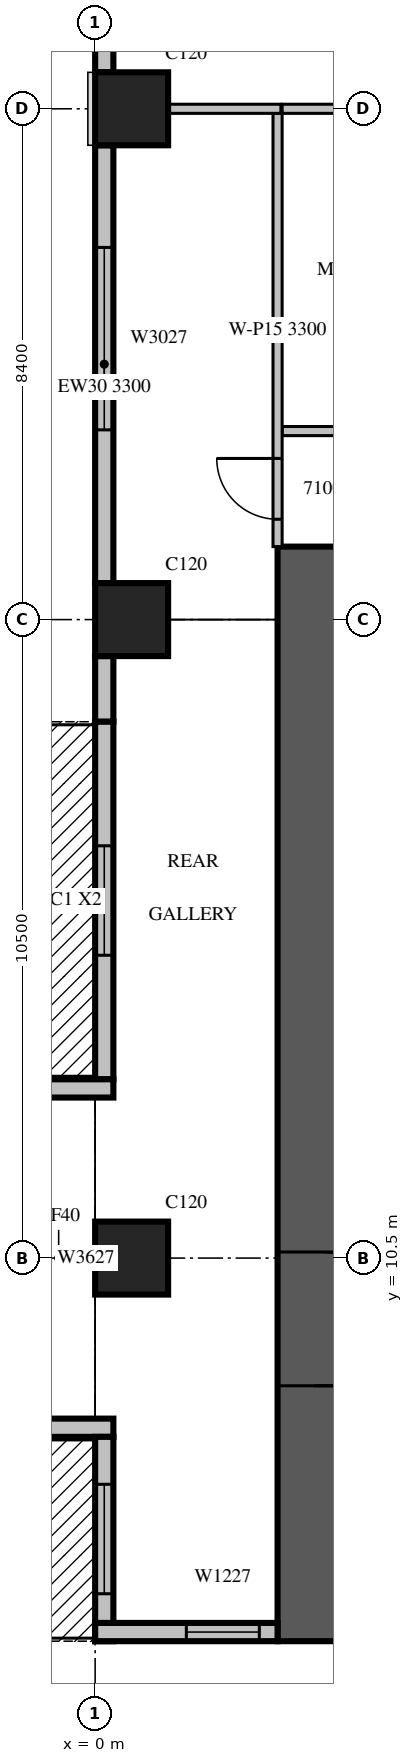
"""IFC4 building model, lengths in metres.
Left out: names, types, materials, properties, quantities, classifications, styles, units other than length and angle.
Written with IfcOpenShell. Run it as: python <this file> out.ifc"""

import sys

from ifc_helpers import new_model, si_unit, direction, frame, frame_2d, origin, origin_2d, place, context, subcontext, project, spatial, rectangle, extrude, source, transform, mapped, element, fill, save


model = new_model("IFC4")
c1 = context("Model", 3, precision=1e-05, world=origin(), true_north=direction((0.0, 1.0)))
c2 = subcontext(c1, "Body", "Model", "MODEL_VIEW")
j1 = project(units=[si_unit("LENGTHUNIT", "METRE"), si_unit("PLANEANGLEUNIT", "RADIAN")], contexts=[c1])
p1 = place(None, origin())
s1 = spatial("IfcSite", under=j1, at=p1, CompositionType="ELEMENT")
p2 = place(p1, origin())
s2 = spatial("IfcBuilding", under=s1, at=p2, CompositionType="ELEMENT")
p3 = place(p2, frame((0.0, 0.0, 53.1)))
s3 = spatial("IfcBuildingStorey", under=s2, at=p3, CompositionType="ELEMENT", Elevation=53.1)
m1 = source(origin(), c2, "Body", "SweptSolid", [
    extrude(rectangle(XDim=1.2, YDim=1.2, at=origin_2d()), origin(), (0.0, 0.0, 1.0), 4.2),
])
for number, where, z_axis, x_axis in (
    (1, (0.6, 10.5, 0.0), (0.0, 0.0, 1.0), (1.0, 0.0, 0.0)),
    (2, (0.6, 21.0, 0.0), (0.0, 0.0, 1.0), (1.0, 0.0, 0.0)),
    (3, (0.6, 29.4, 0.0), (0.0, 0.0, 1.0), (1.0, 0.0, 0.0)),
):
    element("IfcColumn", number, at=place(p3, frame(where, z_axis=z_axis, x_axis=x_axis)), inside=s3, PredefinedType="COLUMN", context=c2, shape_type="MappedRepresentation", body=[
        mapped(m1, transform((0.0, 0.0, 0.0), scale=1.0)),
    ])
m2 = source(origin(), c2, "Body", "SweptSolid", [
    extrude(rectangle(XDim=18.0, YDim=1.2, at=frame_2d((9.0, 0.0))), origin(), (0.0, 0.0, 1.0), 4.2),
])
p4 = place(p3, frame((3.6, 4.2, 0.0), z_axis=(0.0, 0.0, 1.0), x_axis=(0.0, 1.0, 0.0)))
e4 = element("IfcWall", 4, at=p4, inside=s3, PredefinedType="SHEAR", context=c2, shape_type="MappedRepresentation", body=[
    mapped(m2, transform((0.0, 0.0, 0.0), scale=1.0)),
])
m3 = source(origin(), c2, "Body", "SweptSolid", [
    extrude(rectangle(XDim=2.2, YDim=2.1, at=frame_2d((1.1, 1.05))), frame((0.0, 0.61, 0.0), z_axis=(0.0, -1.0, 0.0), x_axis=(1.0, 0.0, 0.0)), (0.0, 0.0, 1.0), 1.22),
])
p5 = place(p4, frame((4.2, 0.0, 0.0)))
e5 = element("IfcOpeningElement", 5, at=p5, cuts=e4, PredefinedType="OPENING", context=c2, shape_type="MappedRepresentation", body=[
    mapped(m3, transform((0.0, 0.0, 0.0), scale=1.0)),
])
m4 = source(origin(), c2, "Body", "SweptSolid", [
    extrude(rectangle(XDim=7.2, YDim=0.3, at=frame_2d((3.6, 0.0))), origin(), (0.0, 0.0, 1.0), 3.8),
])
p6 = place(p3, frame((0.15, 37.2, 0.0), z_axis=(0.0, 0.0, 1.0), x_axis=(0.0, -1.0, 0.0)))
e6 = element("IfcWall", 6, at=p6, inside=s3, PredefinedType="STANDARD", context=c2, shape_type="MappedRepresentation", body=[
    mapped(m4, transform((0.0, 0.0, 0.0), scale=1.0)),
])
m5 = source(origin(), c2, "Body", "SweptSolid", [
    extrude(rectangle(XDim=1.8, YDim=2.7, at=frame_2d((0.9, 1.35))), frame((0.0, 0.16, 0.0), z_axis=(0.0, -1.0, 0.0), x_axis=(1.0, 0.0, 0.0)), (0.0, 0.0, 1.0), 0.32),
])
p7 = place(p6, frame((0.738, 0.0, 0.6)))
e7 = element("IfcOpeningElement", 7, at=p7, cuts=e6, PredefinedType="OPENING", context=c2, shape_type="MappedRepresentation", body=[
    mapped(m5, transform((0.0, 0.0, 0.0), scale=1.0)),
])
m6 = source(origin(), c2, "Body", "SweptSolid", [
    extrude(rectangle(XDim=2.4, YDim=2.7, at=frame_2d((1.2, 1.35))), frame((0.0, 0.16, 0.0), z_axis=(0.0, -1.0, 0.0), x_axis=(1.0, 0.0, 0.0)), (0.0, 0.0, 1.0), 0.32),
])
p8 = place(p6, frame((3.7, 0.0, 0.6)))
e8 = element("IfcOpeningElement", 8, at=p8, cuts=e6, PredefinedType="OPENING", context=c2, shape_type="MappedRepresentation", body=[
    mapped(m6, transform((0.0, 0.0, 0.0), scale=1.0)),
])
m7 = source(origin(), c2, "Body", "SweptSolid", [
    extrude(rectangle(XDim=7.2, YDim=0.3, at=frame_2d((3.6, 0.0))), origin(), (0.0, 0.0, 1.0), 3.3),
])
p9 = place(p3, frame((0.15, 28.8, 0.0), z_axis=(0.0, 0.0, 1.0), x_axis=(0.0, -1.0, 0.0)))
e9 = element("IfcWall", 9, at=p9, inside=s3, PredefinedType="STANDARD", context=c2, shape_type="MappedRepresentation", body=[
    mapped(m7, transform((0.0, 0.0, 0.0), scale=1.0)),
])
m8 = source(origin(), c2, "Body", "SweptSolid", [
    extrude(rectangle(XDim=3.0, YDim=2.7, at=frame_2d((1.5, 1.35))), frame((0.0, 0.16, 0.0), z_axis=(0.0, -1.0, 0.0), x_axis=(1.0, 0.0, 0.0)), (0.0, 0.0, 1.0), 0.32),
])
p10 = place(p9, frame((1.68, 0.0, 0.6)))
e10 = element("IfcOpeningElement", 10, at=p10, cuts=e9, PredefinedType="OPENING", context=c2, shape_type="MappedRepresentation", body=[
    mapped(m8, transform((0.0, 0.0, 0.0), scale=1.0)),
])
m9 = source(origin(), c2, "Body", "SweptSolid", [
    extrude(rectangle(XDim=1.08, YDim=0.3, at=frame_2d((0.54, 0.0))), origin(), (0.0, 0.0, 1.0), 3.8),
])
p11 = place(p3, frame((0.15, 20.4, 0.0), z_axis=(0.0, 0.0, 1.0), x_axis=(0.0, -1.0, 0.0)))
e11 = element("IfcWall", 11, at=p11, inside=s3, PredefinedType="STANDARD", context=c2, shape_type="MappedRepresentation", body=[
    mapped(m9, transform((0.0, 0.0, 0.0), scale=1.0)),
])
m10 = source(origin(), c2, "Body", "SweptSolid", [
    extrude(rectangle(XDim=5.88, YDim=0.3, at=frame_2d((2.94, 0.0))), origin(), (0.0, 0.0, 1.0), 3.8),
])
p12 = place(p3, frame((0.15, 19.32, 0.0), z_axis=(0.0, 0.0, 1.0), x_axis=(0.0, -1.0, 0.0)))
e12 = element("IfcWall", 12, at=p12, inside=s3, PredefinedType="STANDARD", context=c2, shape_type="MappedRepresentation", body=[
    mapped(m10, transform((0.0, 0.0, 0.0), scale=1.0)),
])
m11 = source(origin(), c2, "Body", "SweptSolid", [
    extrude(rectangle(XDim=1.8, YDim=2.4, at=frame_2d((0.9, 1.2))), frame((0.0, 0.16, 0.0), z_axis=(0.0, -1.0, 0.0), x_axis=(1.0, 0.0, 0.0)), (0.0, 0.0, 1.0), 0.32),
])
p13 = place(p12, frame((2.04, 0.0, 0.0)))
e13 = element("IfcOpeningElement", 13, at=p13, cuts=e12, PredefinedType="OPENING", context=c2, shape_type="MappedRepresentation", body=[
    mapped(m11, transform((0.0, 0.0, 0.0), scale=1.0)),
])
m12 = source(origin(), c2, "Body", "SweptSolid", [
    extrude(rectangle(XDim=1.2, YDim=0.3, at=frame_2d((0.6, 0.0))), origin(), (0.0, 0.0, 1.0), 3.8),
])
for number, where, z_axis, x_axis in (
    (14, (0.3, 13.29, 0.0), (0.0, 0.0, 1.0), (-1.0, 0.0, 0.0)),
    (15, (0.3, 7.71, 0.0), (0.0, 0.0, 1.0), (-1.0, 0.0, 0.0)),
):
    element("IfcWall", number, at=place(p3, frame(where, z_axis=z_axis, x_axis=x_axis)), inside=s3, PredefinedType="STANDARD", context=c2, shape_type="MappedRepresentation", body=[
        mapped(m12, transform((0.0, 0.0, 0.0), scale=1.0)),
    ])
m13 = source(origin(), c2, "Body", "SweptSolid", [
    extrude(rectangle(XDim=3.36, YDim=0.3, at=frame_2d((1.68, 0.0))), origin(), (0.0, 0.0, 1.0), 3.8),
])
p14 = place(p3, frame((0.15, 7.56, 0.0), z_axis=(0.0, 0.0, 1.0), x_axis=(0.0, -1.0, 0.0)))
e16 = element("IfcWall", 16, at=p14, inside=s3, PredefinedType="STANDARD", context=c2, shape_type="MappedRepresentation", body=[
    mapped(m13, transform((0.0, 0.0, 0.0), scale=1.0)),
])
p15 = place(p14, frame((0.78, 0.0, 0.0)))
e17 = element("IfcOpeningElement", 17, at=p15, cuts=e16, PredefinedType="OPENING", context=c2, shape_type="MappedRepresentation", body=[
    mapped(m11, transform((0.0, 0.0, 0.0), scale=1.0)),
])
m14 = source(origin(), c2, "Body", "SweptSolid", [
    extrude(rectangle(XDim=3.0, YDim=0.3, at=frame_2d((1.5, 0.0))), origin(), (0.0, 0.0, 1.0), 3.8),
])
p16 = place(p3, frame((0.0, 4.35, 0.0), z_axis=(0.0, 0.0, 1.0), x_axis=(1.0, 0.0, 0.0)))
e18 = element("IfcWall", 18, at=p16, inside=s3, PredefinedType="STANDARD", context=c2, shape_type="MappedRepresentation", body=[
    mapped(m14, transform((0.0, 0.0, 0.0), scale=1.0)),
])
m15 = source(origin(), c2, "Body", "SweptSolid", [
    extrude(rectangle(XDim=1.2, YDim=2.7, at=frame_2d((0.6, 1.35))), frame((0.0, 0.16, 0.0), z_axis=(0.0, -1.0, 0.0), x_axis=(1.0, 0.0, 0.0)), (0.0, 0.0, 1.0), 0.32),
])
p17 = place(p16, frame((1.5, 0.0, 0.6)))
e19 = element("IfcOpeningElement", 19, at=p17, cuts=e18, PredefinedType="OPENING", context=c2, shape_type="MappedRepresentation", body=[
    mapped(m15, transform((0.0, 0.0, 0.0), scale=1.0)),
])
m16 = source(origin(), c2, "Body", "SweptSolid", [
    extrude(rectangle(XDim=11.925, YDim=0.15, at=frame_2d((5.963, 0.0))), origin(), (0.0, 0.0, 1.0), 2.8),
])
p18 = place(p3, frame((3.075, 24.1, 0.0), z_axis=(0.0, 0.0, 1.0), x_axis=(1.0, 0.0, 0.0)))
e20 = element("IfcWall", 20, at=p18, inside=s3, PredefinedType="PARTITIONING", context=c2, shape_type="MappedRepresentation", body=[
    mapped(m16, transform((0.0, 0.0, 0.0), scale=1.0)),
])
m17 = source(origin(), c2, "Body", "SweptSolid", [
    extrude(rectangle(XDim=0.9, YDim=2.1, at=frame_2d((0.45, 1.05))), frame((0.0, 0.085, 0.0), z_axis=(0.0, -1.0, 0.0), x_axis=(1.0, 0.0, 0.0)), (0.0, 0.0, 1.0), 0.17),
])
p19 = place(p18, frame((1.462, 0.0, 0.0)))
e21 = element("IfcOpeningElement", 21, at=p19, cuts=e20, PredefinedType="OPENING", context=c2, shape_type="MappedRepresentation", body=[
    mapped(m17, transform((0.0, 0.0, 0.0), scale=1.0)),
])
p20 = place(p18, frame((8.3, 0.0, 0.0)))
e22 = element("IfcOpeningElement", 22, at=p20, cuts=e20, PredefinedType="OPENING", context=c2, shape_type="MappedRepresentation", body=[
    mapped(m17, transform((0.0, 0.0, 0.0), scale=1.0)),
])
m18 = source(origin(), c2, "Body", "SweptSolid", [
    extrude(rectangle(XDim=6.826, YDim=0.15, at=frame_2d((3.413, 0.0))), origin(), (0.0, 0.0, 1.0), 3.8),
])
p21 = place(p3, frame((9.901, 29.4, 0.0), z_axis=(0.0, 0.0, 1.0), x_axis=(-1.0, 0.0, 0.0)))
e23 = element("IfcWall", 23, at=p21, inside=s3, PredefinedType="PARTITIONING", context=c2, shape_type="MappedRepresentation", body=[
    mapped(m18, transform((0.0, 0.0, 0.0), scale=1.0)),
])
m19 = source(origin(), c2, "Body", "SweptSolid", [
    extrude(rectangle(XDim=7.125, YDim=0.15, at=frame_2d((3.562, 0.0))), origin(), (0.0, 0.0, 1.0), 3.3),
])
p22 = place(p3, frame((3.0, 29.325, 0.0), z_axis=(0.0, 0.0, 1.0), x_axis=(0.0, -1.0, 0.0)))
e24 = element("IfcWall", 24, at=p22, inside=s3, PredefinedType="PARTITIONING", context=c2, shape_type="MappedRepresentation", body=[
    mapped(m19, transform((0.0, 0.0, 0.0), scale=1.0)),
])
m20 = source(origin(), c2, "Body", "SweptSolid", [
    extrude(rectangle(XDim=1.0, YDim=2.1, at=frame_2d((0.5, 1.05))), frame((0.0, 0.085, 0.0), z_axis=(0.0, -1.0, 0.0), x_axis=(1.0, 0.0, 0.0)), (0.0, 0.0, 1.0), 0.17),
])
p23 = place(p22, frame((5.675, 0.0, 0.0)))
e25 = element("IfcOpeningElement", 25, at=p23, cuts=e24, PredefinedType="OPENING", context=c2, shape_type="MappedRepresentation", body=[
    mapped(m20, transform((0.0, 0.0, 0.0), scale=1.0)),
])
m21 = source(origin(), c2, "Body", "SweptSolid", [
    extrude(rectangle(XDim=1.856, YDim=0.15, at=frame_2d((0.928, 0.0))), origin(), (0.0, 0.0, 1.0), 3.8),
])
p24 = place(p3, frame((3.055, 29.4, 0.0), z_axis=(0.0, 0.0, 1.0), x_axis=(-1.0, 0.0, 0.0)))
e26 = element("IfcWall", 26, at=p24, inside=s3, PredefinedType="PARTITIONING", context=c2, shape_type="MappedRepresentation", body=[
    mapped(m21, transform((0.0, 0.0, 0.0), scale=1.0)),
])
m22 = source(origin(), c2, "Body", "SweptSolid", [
    extrude(rectangle(XDim=3.0, YDim=2.7, at=frame_2d((1.5, 1.35))), frame((0.0, 0.03, 0.0), z_axis=(0.0, -1.0, 0.0), x_axis=(1.0, 0.0, 0.0)), (0.0, 0.0, 1.0), 0.06),
])
p25 = place(p10, origin())
e27 = element("IfcWindow", 27, at=p25, inside=s3, PartitioningType="SINGLE_PANEL", PredefinedType="WINDOW", context=c2, shape_type="MappedRepresentation", body=[
    mapped(m22, transform((0.0, 0.0, 0.0), scale=1.0)),
])
fill(e10, e27)
m23 = source(origin(), c2, "Body", "SweptSolid", [
    extrude(rectangle(XDim=1.8, YDim=2.4, at=frame_2d((0.9, 1.2))), frame((0.0, 0.025, 0.0), z_axis=(0.0, -1.0, 0.0), x_axis=(1.0, 0.0, 0.0)), (0.0, 0.0, 1.0), 0.05),
])
p26 = place(p13, origin())
e28 = element("IfcDoor", 28, at=p26, inside=s3, OperationType="SLIDING_TO_LEFT", PredefinedType="DOOR", context=c2, shape_type="MappedRepresentation", body=[
    mapped(m23, transform((0.0, 0.0, 0.0), scale=1.0)),
])
fill(e13, e28)
p27 = place(p15, origin())
e29 = element("IfcDoor", 29, at=p27, inside=s3, OperationType="SLIDING_TO_LEFT", PredefinedType="DOOR", context=c2, shape_type="MappedRepresentation", body=[
    mapped(m23, transform((0.0, 0.0, 0.0), scale=1.0)),
])
fill(e17, e29)
m24 = source(origin(), c2, "Body", "SweptSolid", [
    extrude(rectangle(XDim=1.2, YDim=2.7, at=frame_2d((0.6, 1.35))), frame((0.0, 0.03, 0.0), z_axis=(0.0, -1.0, 0.0), x_axis=(1.0, 0.0, 0.0)), (0.0, 0.0, 1.0), 0.06),
])
p28 = place(p17, origin())
e30 = element("IfcWindow", 30, at=p28, inside=s3, PartitioningType="SINGLE_PANEL", PredefinedType="WINDOW", context=c2, shape_type="MappedRepresentation", body=[
    mapped(m24, transform((0.0, 0.0, 0.0), scale=1.0)),
])
fill(e19, e30)
m25 = source(origin(), c2, "Body", "SweptSolid", [
    extrude(rectangle(XDim=2.2, YDim=2.1, at=frame_2d((1.1, 1.05))), frame((0.0, 0.025, 0.0), z_axis=(0.0, -1.0, 0.0), x_axis=(1.0, 0.0, 0.0)), (0.0, 0.0, 1.0), 0.05),
])
p29 = place(p5, origin())
e31 = element("IfcDoor", 31, at=p29, inside=s3, OperationType="DOUBLE_DOOR_SINGLE_SWING", PredefinedType="DOOR", context=c2, shape_type="MappedRepresentation", body=[
    mapped(m25, transform((0.0, 0.0, 0.0), scale=1.0)),
])
fill(e5, e31)
m26 = source(origin(), c2, "Body", "SweptSolid", [
    extrude(rectangle(XDim=1.0, YDim=2.1, at=frame_2d((0.5, 1.05))), frame((0.0, 0.025, 0.0), z_axis=(0.0, -1.0, 0.0), x_axis=(1.0, 0.0, 0.0)), (0.0, 0.0, 1.0), 0.05),
])
p30 = place(p23, origin())
e32 = element("IfcDoor", 32, at=p30, inside=s3, OperationType="SINGLE_SWING_RIGHT", PredefinedType="DOOR", context=c2, shape_type="MappedRepresentation", body=[
    mapped(m26, transform((0.0, 0.0, 0.0), scale=1.0)),
])
fill(e25, e32)
save(model, sys.argv[1])
